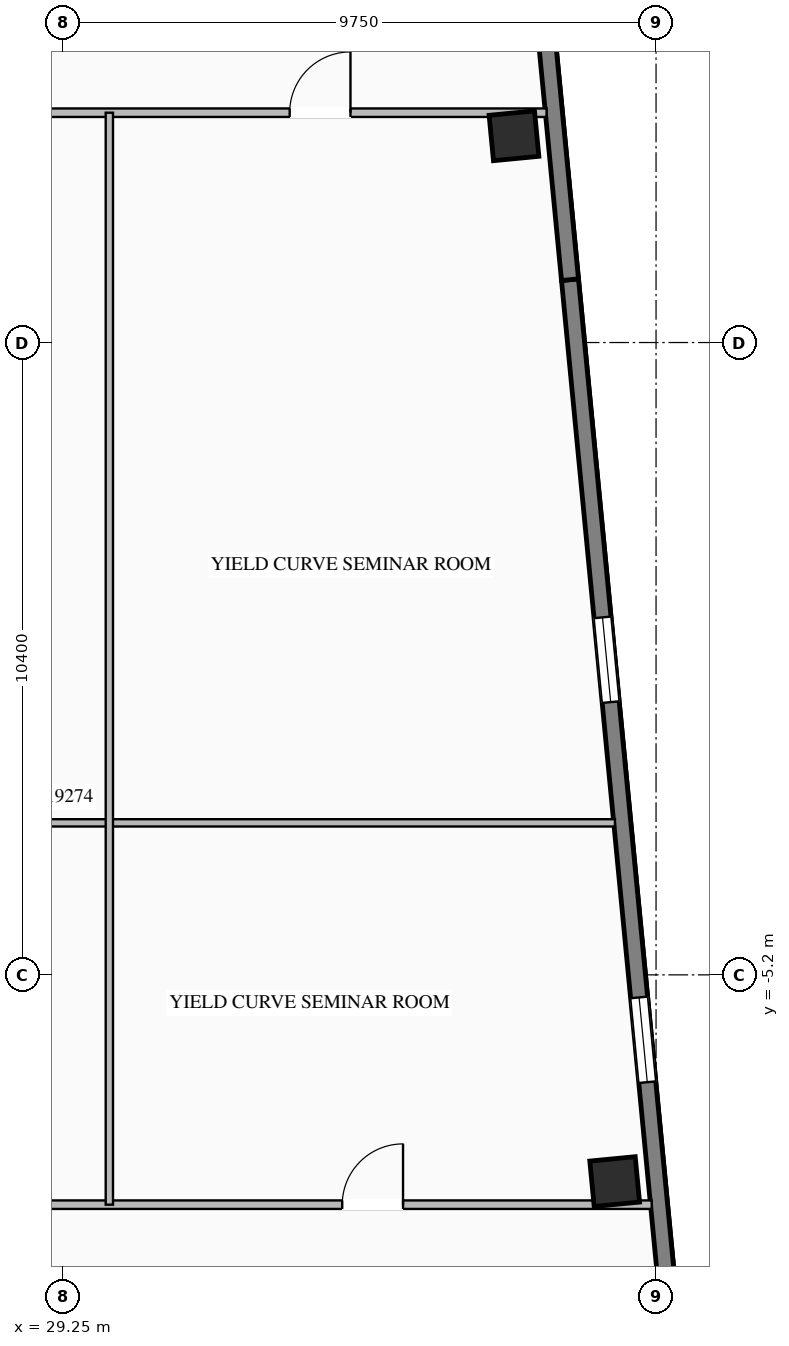
"""IFC4 building model, lengths in metres.
Left out: names, types, materials, properties, quantities, classifications, styles, units other than length and angle.
Written with IfcOpenShell. Run it as: python <this file> out.ifc"""

import sys

from ifc_helpers import new_model, si_unit, direction, frame, frame_2d, origin, origin_2d, place, context, subcontext, project, spatial, rectangle, i_section, extrude, element, fill, save


model = new_model("IFC4")
c1 = context("Model", 3, precision=1e-05, world=origin(), true_north=direction((0.0, 1.0)))
c2 = subcontext(c1, "Body", "Model", "MODEL_VIEW")
j1 = project(units=[si_unit("LENGTHUNIT", "METRE"), si_unit("PLANEANGLEUNIT", "RADIAN")], contexts=[c1])
p1 = place(None, origin())
s1 = spatial("IfcSite", under=j1, at=p1, CompositionType="ELEMENT")
p2 = place(p1, origin())
s2 = spatial("IfcBuilding", under=s1, at=p2, CompositionType="ELEMENT")
p3 = place(p2, frame((0.0, 0.0, 74.2)))
s3 = spatial("IfcBuildingStorey", under=s2, at=p3, CompositionType="ELEMENT", Elevation=74.2)
for number, where, z_axis, x_axis in (
    (1, (38.32, -8.6, 0.0), (0.0, 0.0, 1.0), (0.995, 0.096, 0.0)),
    (2, (36.664, 8.6, 0.0), (0.0, 0.0, 1.0), (0.995, 0.096, 0.0)),
):
    element("IfcColumn", number, at=place(p3, frame(where, z_axis=z_axis, x_axis=x_axis)), inside=s3, PredefinedType="COLUMN", context=c2, shape_type="SweptSolid", body=[
        extrude(i_section(OverallWidth=0.75, OverallDepth=0.75, WebThickness=0.03, FlangeThickness=0.044, at=origin_2d()), origin(), (0.0, 0.0, 1.0), 3.45),
    ])
p4 = place(p3, frame((37.585, 6.234, 0.0), z_axis=(0.0, 0.0, 1.0), x_axis=(0.095841297881, -0.99539662729, 0.0)))
e3 = element("IfcWall", 3, at=p4, inside=s3, PredefinedType="STANDARD", context=c2, shape_type="SweptSolid", body=[
    extrude(rectangle(XDim=18.84, YDim=0.28, at=frame_2d((9.42, 0.0))), origin(), (0.0, 0.0, 1.0), 3.25),
])
p5 = place(p4, frame((5.58, 0.0, 0.76)))
e4 = element("IfcOpeningElement", 4, at=p5, cuts=e3, PredefinedType="OPENING", context=c2, shape_type="SweptSolid", body=[
    extrude(rectangle(XDim=1.4, YDim=1.95, at=frame_2d((0.7, 0.975))), frame((0.0, 0.15, 0.0), z_axis=(0.0, -1.0, 0.0), x_axis=(1.0, 0.0, 0.0)), (0.0, 0.0, 1.0), 0.3),
])
p6 = place(p4, frame((11.86, 0.0, 0.76)))
e5 = element("IfcOpeningElement", 5, at=p6, cuts=e3, PredefinedType="OPENING", context=c2, shape_type="SweptSolid", body=[
    extrude(rectangle(XDim=1.4, YDim=1.95, at=frame_2d((0.7, 0.975))), frame((0.0, 0.15, 0.0), z_axis=(0.0, -1.0, 0.0), x_axis=(1.0, 0.0, 0.0)), (0.0, 0.0, 1.0), 0.3),
])
p7 = place(p3, frame((35.779, 24.987, 0.0), z_axis=(0.0, 0.0, 1.0), x_axis=(0.095842534142, -0.995396508256, 0.0)))
e6 = element("IfcWall", 6, at=p7, inside=s3, PredefinedType="STANDARD", context=c2, shape_type="SweptSolid", body=[
    extrude(rectangle(XDim=18.84, YDim=0.28, at=frame_2d((9.42, 0.0))), origin(), (0.0, 0.0, 1.0), 3.25),
])
p8 = place(p7, frame((5.58, 0.0, 0.76)))
e7 = element("IfcOpeningElement", 7, at=p8, cuts=e6, PredefinedType="OPENING", context=c2, shape_type="SweptSolid", body=[
    extrude(rectangle(XDim=1.4, YDim=1.95, at=frame_2d((0.7, 0.975))), frame((0.0, 0.15, 0.0), z_axis=(0.0, -1.0, 0.0), x_axis=(1.0, 0.0, 0.0)), (0.0, 0.0, 1.0), 0.3),
])
p9 = place(p7, frame((11.86, 0.0, 0.76)))
e8 = element("IfcOpeningElement", 8, at=p9, cuts=e6, PredefinedType="OPENING", context=c2, shape_type="SweptSolid", body=[
    extrude(rectangle(XDim=1.4, YDim=1.95, at=frame_2d((0.7, 0.975))), frame((0.0, 0.15, 0.0), z_axis=(0.0, -1.0, 0.0), x_axis=(1.0, 0.0, 0.0)), (0.0, 0.0, 1.0), 0.3),
])
p10 = place(p3, frame((19.05, 8.98, 0.0), z_axis=(0.0, 0.0, 1.0), x_axis=(1.0, 0.0, 0.0)))
e9 = element("IfcWall", 9, at=p10, inside=s3, PredefinedType="STANDARD", context=c2, shape_type="SweptSolid", body=[
    extrude(rectangle(XDim=18.15, YDim=0.14, at=frame_2d((9.075, 0.0))), origin(), (0.0, 0.0, 1.0), 3.25),
])
p11 = place(p10, frame((0.32, 0.0, 0.0)))
e10 = element("IfcOpeningElement", 10, at=p11, cuts=e9, PredefinedType="OPENING", context=c2, shape_type="SweptSolid", body=[
    extrude(rectangle(XDim=1.0, YDim=2.08, at=frame_2d((0.5, 1.04))), frame((0.0, 0.08, 0.0), z_axis=(0.0, -1.0, 0.0), x_axis=(1.0, 0.0, 0.0)), (0.0, 0.0, 1.0), 0.16),
])
p12 = place(p10, frame((13.924, 0.0, 0.0)))
e11 = element("IfcOpeningElement", 11, at=p12, cuts=e9, PredefinedType="OPENING", context=c2, shape_type="SweptSolid", body=[
    extrude(rectangle(XDim=1.0, YDim=2.08, at=frame_2d((0.5, 1.04))), frame((0.0, 0.08, 0.0), z_axis=(0.0, -1.0, 0.0), x_axis=(1.0, 0.0, 0.0)), (0.0, 0.0, 1.0), 0.16),
])
p13 = place(p3, frame((19.05, -8.98, 0.0), z_axis=(0.0, 0.0, 1.0), x_axis=(1.0, 0.0, 0.0)))
e12 = element("IfcWall", 12, at=p13, inside=s3, PredefinedType="STANDARD", context=c2, shape_type="SweptSolid", body=[
    extrude(rectangle(XDim=19.879, YDim=0.14, at=frame_2d((9.939, 0.0))), origin(), (0.0, 0.0, 1.0), 3.25),
])
p14 = place(p13, frame((0.32, 0.0, 0.0)))
e13 = element("IfcOpeningElement", 13, at=p14, cuts=e12, PredefinedType="OPENING", context=c2, shape_type="SweptSolid", body=[
    extrude(rectangle(XDim=1.0, YDim=2.08, at=frame_2d((0.5, 1.04))), frame((0.0, 0.08, 0.0), z_axis=(0.0, -1.0, 0.0), x_axis=(1.0, 0.0, 0.0)), (0.0, 0.0, 1.0), 0.16),
])
p15 = place(p13, frame((14.789, 0.0, 0.0)))
e14 = element("IfcOpeningElement", 14, at=p15, cuts=e12, PredefinedType="OPENING", context=c2, shape_type="SweptSolid", body=[
    extrude(rectangle(XDim=1.0, YDim=2.08, at=frame_2d((0.5, 1.04))), frame((0.0, 0.08, 0.0), z_axis=(0.0, -1.0, 0.0), x_axis=(1.0, 0.0, 0.0)), (0.0, 0.0, 1.0), 0.16),
])
p16 = place(p3, frame((19.05, -2.7, 0.0), z_axis=(0.0, 0.0, 1.0), x_axis=(1.0, 0.0, 0.0)))
e15 = element("IfcWall", 15, at=p16, inside=s3, PredefinedType="STANDARD", context=c2, shape_type="SweptSolid", body=[
    extrude(rectangle(XDim=19.274, YDim=0.12, at=frame_2d((9.637, 0.0))), origin(), (0.0, 0.0, 1.0), 3.25),
])
p17 = place(p3, frame((30.009, -8.98, 0.0), z_axis=(0.0, 0.0, 1.0), x_axis=(0.0, 1.0, 0.0)))
e16 = element("IfcWall", 16, at=p17, inside=s3, PredefinedType="STANDARD", context=c2, shape_type="SweptSolid", body=[
    extrude(rectangle(XDim=17.96, YDim=0.12, at=frame_2d((8.98, 0.0))), origin(), (0.0, 0.0, 1.0), 3.25),
])
p18 = place(p5, origin())
e17 = element("IfcWindow", 17, at=p18, inside=s3, PartitioningType="SINGLE_PANEL", PredefinedType="WINDOW", context=c2, shape_type="SweptSolid", body=[
    extrude(rectangle(XDim=1.4, YDim=1.95, at=frame_2d((0.7, 0.975))), frame((0.0, 0.03, 0.0), z_axis=(0.0, -1.0, 0.0), x_axis=(1.0, 0.0, 0.0)), (0.0, 0.0, 1.0), 0.06),
])
fill(e4, e17)
p19 = place(p6, origin())
e18 = element("IfcWindow", 18, at=p19, inside=s3, PartitioningType="SINGLE_PANEL", PredefinedType="WINDOW", context=c2, shape_type="SweptSolid", body=[
    extrude(rectangle(XDim=1.4, YDim=1.95, at=frame_2d((0.7, 0.975))), frame((0.0, 0.03, 0.0), z_axis=(0.0, -1.0, 0.0), x_axis=(1.0, 0.0, 0.0)), (0.0, 0.0, 1.0), 0.06),
])
fill(e5, e18)
p20 = place(p12, origin())
e19 = element("IfcDoor", 19, at=p20, inside=s3, OperationType="SINGLE_SWING_RIGHT", PredefinedType="DOOR", context=c2, shape_type="SweptSolid", body=[
    extrude(rectangle(XDim=1.0, YDim=2.08, at=frame_2d((0.5, 1.04))), frame((0.0, 0.025, 0.0), z_axis=(0.0, -1.0, 0.0), x_axis=(1.0, 0.0, 0.0)), (0.0, 0.0, 1.0), 0.05),
])
fill(e11, e19)
p21 = place(p15, origin())
e20 = element("IfcDoor", 20, at=p21, inside=s3, OperationType="SINGLE_SWING_RIGHT", PredefinedType="DOOR", context=c2, shape_type="SweptSolid", body=[
    extrude(rectangle(XDim=1.0, YDim=2.08, at=frame_2d((0.5, 1.04))), frame((0.0, 0.025, 0.0), z_axis=(0.0, -1.0, 0.0), x_axis=(1.0, 0.0, 0.0)), (0.0, 0.0, 1.0), 0.05),
])
fill(e14, e20)
save(model, sys.argv[1])
